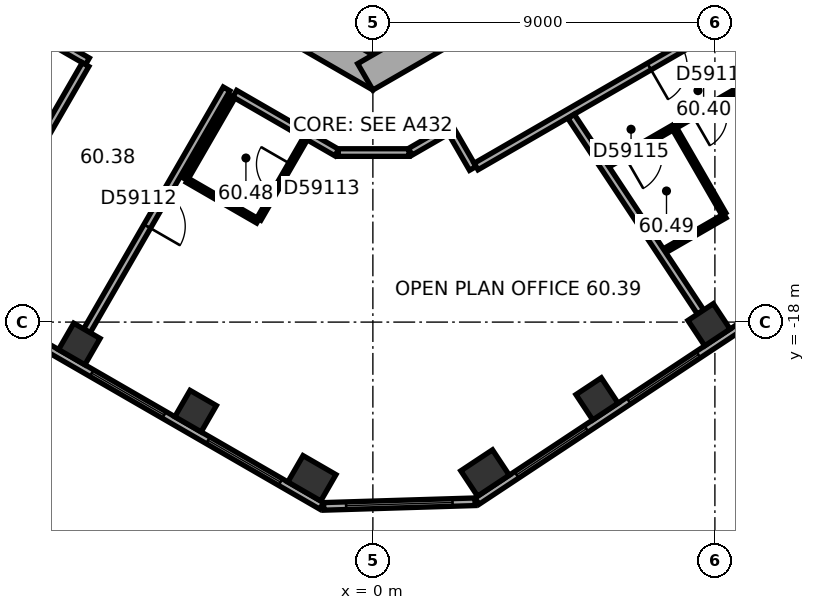
"""IFC4 building model, lengths in metres.
Left out: names, types, materials, properties, quantities, classifications, styles, units other than length and angle.
Written with IfcOpenShell. Run it as: python <this file> out.ifc"""

import sys

from ifc_helpers import new_model, si_unit, direction, frame, frame_2d, origin, origin_2d, place, context, subcontext, project, spatial, rectangle, extrude, element, fill, save


model = new_model("IFC4")
c1 = context("Model", 3, precision=1e-05, world=origin(), true_north=direction((0.0, 1.0)))
c2 = subcontext(c1, "Body", "Model", "MODEL_VIEW")
j1 = project(units=[si_unit("LENGTHUNIT", "METRE"), si_unit("PLANEANGLEUNIT", "RADIAN")], contexts=[c1])
p1 = place(None, origin())
s1 = spatial("IfcSite", under=j1, at=p1, CompositionType="ELEMENT")
p2 = place(p1, origin())
s2 = spatial("IfcBuilding", under=s1, at=p2, CompositionType="ELEMENT")
p3 = place(p2, frame((0.0, 0.0, 243.9)))
s3 = spatial("IfcBuildingStorey", under=s2, at=p3, CompositionType="ELEMENT", Elevation=243.9)
for number, where, z_axis, x_axis in (
    (1, (-7.725, -18.576, 0.0), (0.0, 0.0, 1.0), (0.866, -0.5, 0.0)),
    (2, (-4.665, -20.343, 0.0), (0.0, 0.0, 1.0), (0.866, -0.5, 0.0)),
):
    element("IfcColumn", number, at=place(p3, frame(where, z_axis=z_axis, x_axis=x_axis)), inside=s3, PredefinedType="COLUMN", context=c2, shape_type="SweptSolid", body=[
        extrude(rectangle(XDim=0.8, YDim=0.8, at=origin_2d()), origin(), (0.0, 0.0, 1.0), 3.7),
    ])
for number, where, z_axis, x_axis in (
    (3, (-1.604, -22.11, 0.0), (0.0, 0.0, 1.0), (0.866, -0.5, 0.0)),
    (4, (2.951, -21.971, 0.0), (0.0, 0.0, 1.0), (0.834, 0.552, 0.0)),
):
    element("IfcColumn", number, at=place(p3, frame(where, z_axis=z_axis, x_axis=x_axis)), inside=s3, PredefinedType="COLUMN", context=c2, shape_type="SweptSolid", body=[
        extrude(rectangle(XDim=1.0, YDim=0.8, at=origin_2d()), origin(), (0.0, 0.0, 1.0), 3.7),
    ])
for number, where, z_axis, x_axis in (
    (5, (5.898, -20.021, 0.0), (0.0, 0.0, 1.0), (0.834, 0.552, 0.0)),
    (6, (8.844, -18.07, 0.0), (0.0, 0.0, 1.0), (0.834, 0.552, 0.0)),
):
    element("IfcColumn", number, at=place(p3, frame(where, z_axis=z_axis, x_axis=x_axis)), inside=s3, PredefinedType="COLUMN", context=c2, shape_type="SweptSolid", body=[
        extrude(rectangle(XDim=0.8, YDim=0.8, at=origin_2d()), origin(), (0.0, 0.0, 1.0), 3.7),
    ])
p4 = place(p3, frame((-10.1, -5.6, 0.0), z_axis=(0.0, 0.0, 1.0), x_axis=(0.866023897231, -0.500002609418, 0.0)))
e7 = element("IfcWall", 7, at=p4, inside=s3, PredefinedType="SHEAR", context=c2, shape_type="SweptSolid", body=[
    extrude(rectangle(XDim=11.894, YDim=0.8, at=frame_2d((5.947, 0.0))), origin(), (0.0, 0.0, 1.0), 3.7),
])
p5 = place(p4, frame((6.147, 0.0, 0.0)))
e8 = element("IfcOpeningElement", 8, at=p5, cuts=e7, PredefinedType="OPENING", context=c2, shape_type="SweptSolid", body=[
    extrude(rectangle(XDim=1.5, YDim=2.1, at=frame_2d((0.75, 1.05))), frame((0.0, 0.41, 0.0), z_axis=(0.0, -1.0, 0.0), x_axis=(1.0, 0.0, 0.0)), (0.0, 0.0, 1.0), 0.82),
])
p6 = place(p4, frame((1.597, 0.0, 0.0)))
e9 = element("IfcOpeningElement", 9, at=p6, cuts=e7, PredefinedType="OPENING", context=c2, shape_type="SweptSolid", body=[
    extrude(rectangle(XDim=1.1, YDim=2.1, at=frame_2d((0.55, 1.05))), frame((0.0, 0.41, 0.0), z_axis=(0.0, -1.0, 0.0), x_axis=(1.0, 0.0, 0.0)), (0.0, 0.0, 1.0), 0.82),
])
p7 = place(p4, frame((4.197, 0.0, 0.0)))
e10 = element("IfcOpeningElement", 10, at=p7, cuts=e7, PredefinedType="OPENING", context=c2, shape_type="SweptSolid", body=[
    extrude(rectangle(XDim=1.1, YDim=2.1, at=frame_2d((0.55, 1.05))), frame((0.0, 0.41, 0.0), z_axis=(0.0, -1.0, 0.0), x_axis=(1.0, 0.0, 0.0)), (0.0, 0.0, 1.0), 0.82),
])
p8 = place(p3, frame((-0.2, -11.547, 0.0), z_axis=(0.0, 0.0, 1.0), x_axis=(0.866023897231, 0.500002609418, 0.0)))
e11 = element("IfcWall", 11, at=p8, inside=s3, PredefinedType="SHEAR", context=c2, shape_type="SweptSolid", body=[
    extrude(rectangle(XDim=11.894, YDim=0.8, at=frame_2d((5.947, 0.0))), origin(), (0.0, 0.0, 1.0), 3.7),
])
p9 = place(p8, frame((2.497, 0.0, 0.0)))
e12 = element("IfcOpeningElement", 12, at=p9, cuts=e11, PredefinedType="OPENING", context=c2, shape_type="SweptSolid", body=[
    extrude(rectangle(XDim=1.1, YDim=2.1, at=frame_2d((0.55, 1.05))), frame((0.0, 0.41, 0.0), z_axis=(0.0, -1.0, 0.0), x_axis=(1.0, 0.0, 0.0)), (0.0, 0.0, 1.0), 0.82),
])
p10 = place(p8, frame((5.097, 0.0, 0.0)))
e13 = element("IfcOpeningElement", 13, at=p10, cuts=e11, PredefinedType="OPENING", context=c2, shape_type="SweptSolid", body=[
    extrude(rectangle(XDim=1.1, YDim=2.1, at=frame_2d((0.55, 1.05))), frame((0.0, 0.41, 0.0), z_axis=(0.0, -1.0, 0.0), x_axis=(1.0, 0.0, 0.0)), (0.0, 0.0, 1.0), 0.82),
])
p11 = place(p8, frame((7.697, 0.0, 0.0)))
e14 = element("IfcOpeningElement", 14, at=p11, cuts=e11, PredefinedType="OPENING", context=c2, shape_type="SweptSolid", body=[
    extrude(rectangle(XDim=1.1, YDim=2.1, at=frame_2d((0.55, 1.05))), frame((0.0, 0.41, 0.0), z_axis=(0.0, -1.0, 0.0), x_axis=(1.0, 0.0, 0.0)), (0.0, 0.0, 1.0), 0.82),
])
p12 = place(p3, frame((-17.664, -13.415, 0.0), z_axis=(0.0, 0.0, 1.0), x_axis=(0.866026555358, -0.49999800541, 0.0)))
e15 = element("IfcWall", 15, at=p12, inside=s3, PredefinedType="STANDARD", context=c2, shape_type="SweptSolid", body=[
    extrude(rectangle(XDim=18.841, YDim=0.2, at=frame_2d((9.421, 0.0))), origin(), (0.0, 0.0, 1.0), 3.7),
])
p13 = place(p12, frame((1.254, 0.0, 0.9)))
e16 = element("IfcOpeningElement", 16, at=p13, cuts=e15, PredefinedType="OPENING", context=c2, shape_type="SweptSolid", body=[
    extrude(rectangle(XDim=2.2, YDim=2.0, at=frame_2d((1.1, 1.0))), frame((0.0, 0.11, 0.0), z_axis=(0.0, -1.0, 0.0), x_axis=(1.0, 0.0, 0.0)), (0.0, 0.0, 1.0), 0.22),
])
p14 = place(p12, frame((4.788, 0.0, 0.9)))
e17 = element("IfcOpeningElement", 17, at=p14, cuts=e15, PredefinedType="OPENING", context=c2, shape_type="SweptSolid", body=[
    extrude(rectangle(XDim=2.2, YDim=2.0, at=frame_2d((1.1, 1.0))), frame((0.0, 0.11, 0.0), z_axis=(0.0, -1.0, 0.0), x_axis=(1.0, 0.0, 0.0)), (0.0, 0.0, 1.0), 0.22),
])
p15 = place(p12, frame((8.322, 0.0, 0.9)))
e18 = element("IfcOpeningElement", 18, at=p15, cuts=e15, PredefinedType="OPENING", context=c2, shape_type="SweptSolid", body=[
    extrude(rectangle(XDim=2.2, YDim=2.0, at=frame_2d((1.1, 1.0))), frame((0.0, 0.11, 0.0), z_axis=(0.0, -1.0, 0.0), x_axis=(1.0, 0.0, 0.0)), (0.0, 0.0, 1.0), 0.22),
])
p16 = place(p12, frame((11.855, 0.0, 0.9)))
e19 = element("IfcOpeningElement", 19, at=p16, cuts=e15, PredefinedType="OPENING", context=c2, shape_type="SweptSolid", body=[
    extrude(rectangle(XDim=2.2, YDim=2.0, at=frame_2d((1.1, 1.0))), frame((0.0, 0.11, 0.0), z_axis=(0.0, -1.0, 0.0), x_axis=(1.0, 0.0, 0.0)), (0.0, 0.0, 1.0), 0.22),
])
p17 = place(p12, frame((15.389, 0.0, 0.9)))
e20 = element("IfcOpeningElement", 20, at=p17, cuts=e15, PredefinedType="OPENING", context=c2, shape_type="SweptSolid", body=[
    extrude(rectangle(XDim=2.2, YDim=2.0, at=frame_2d((1.1, 1.0))), frame((0.0, 0.11, 0.0), z_axis=(0.0, -1.0, 0.0), x_axis=(1.0, 0.0, 0.0)), (0.0, 0.0, 1.0), 0.22),
])
p18 = place(p3, frame((-1.294, -22.849, 0.0), z_axis=(0.0, 0.0, 1.0), x_axis=(0.999533952558, 0.030526671678, 0.0)))
e21 = element("IfcWall", 21, at=p18, inside=s3, PredefinedType="STANDARD", context=c2, shape_type="SweptSolid", body=[
    extrude(rectangle(XDim=3.983, YDim=0.2, at=frame_2d((1.991, 0.0))), origin(), (0.0, 0.0, 1.0), 3.7),
])
p19 = place(p18, frame((0.591, 0.0, 0.9)))
e22 = element("IfcOpeningElement", 22, at=p19, cuts=e21, PredefinedType="OPENING", context=c2, shape_type="SweptSolid", body=[
    extrude(rectangle(XDim=2.8, YDim=2.0, at=frame_2d((1.4, 1.0))), frame((0.0, 0.11, 0.0), z_axis=(0.0, -1.0, 0.0), x_axis=(1.0, 0.0, 0.0)), (0.0, 0.0, 1.0), 0.22),
])
p20 = place(p3, frame((2.739, -22.711, 0.0), z_axis=(0.0, 0.0, 1.0), x_axis=(0.833885723098, 0.551937134838, 0.0)))
e23 = element("IfcWall", 23, at=p20, inside=s3, PredefinedType="STANDARD", context=c2, shape_type="SweptSolid", body=[
    extrude(rectangle(XDim=18.841, YDim=0.2, at=frame_2d((9.421, 0.0))), origin(), (0.0, 0.0, 1.0), 3.7),
])
p21 = place(p20, frame((1.252, 0.0, 0.9)))
e24 = element("IfcOpeningElement", 24, at=p21, cuts=e23, PredefinedType="OPENING", context=c2, shape_type="SweptSolid", body=[
    extrude(rectangle(XDim=2.2, YDim=2.0, at=frame_2d((1.1, 1.0))), frame((0.0, 0.11, 0.0), z_axis=(0.0, -1.0, 0.0), x_axis=(1.0, 0.0, 0.0)), (0.0, 0.0, 1.0), 0.22),
])
p22 = place(p20, frame((4.786, 0.0, 0.9)))
e25 = element("IfcOpeningElement", 25, at=p22, cuts=e23, PredefinedType="OPENING", context=c2, shape_type="SweptSolid", body=[
    extrude(rectangle(XDim=2.2, YDim=2.0, at=frame_2d((1.1, 1.0))), frame((0.0, 0.11, 0.0), z_axis=(0.0, -1.0, 0.0), x_axis=(1.0, 0.0, 0.0)), (0.0, 0.0, 1.0), 0.22),
])
p23 = place(p20, frame((8.32, 0.0, 0.9)))
e26 = element("IfcOpeningElement", 26, at=p23, cuts=e23, PredefinedType="OPENING", context=c2, shape_type="SweptSolid", body=[
    extrude(rectangle(XDim=2.2, YDim=2.0, at=frame_2d((1.1, 1.0))), frame((0.0, 0.11, 0.0), z_axis=(0.0, -1.0, 0.0), x_axis=(1.0, 0.0, 0.0)), (0.0, 0.0, 1.0), 0.22),
])
p24 = place(p20, frame((11.854, 0.0, 0.9)))
e27 = element("IfcOpeningElement", 27, at=p24, cuts=e23, PredefinedType="OPENING", context=c2, shape_type="SweptSolid", body=[
    extrude(rectangle(XDim=2.2, YDim=2.0, at=frame_2d((1.1, 1.0))), frame((0.0, 0.11, 0.0), z_axis=(0.0, -1.0, 0.0), x_axis=(1.0, 0.0, 0.0)), (0.0, 0.0, 1.0), 0.22),
])
p25 = place(p20, frame((15.387, 0.0, 0.9)))
e28 = element("IfcOpeningElement", 28, at=p25, cuts=e23, PredefinedType="OPENING", context=c2, shape_type="SweptSolid", body=[
    extrude(rectangle(XDim=2.2, YDim=2.0, at=frame_2d((1.1, 1.0))), frame((0.0, 0.11, 0.0), z_axis=(0.0, -1.0, 0.0), x_axis=(1.0, 0.0, 0.0)), (0.0, 0.0, 1.0), 0.22),
])
p26 = place(p3, frame((-11.551, -8.805, 0.0), z_axis=(0.0, 0.0, 1.0), x_axis=(0.866038310922, -0.499977643516, 0.0)))
e29 = element("IfcWall", 29, at=p26, inside=s3, PredefinedType="PARTITIONING", context=c2, shape_type="SweptSolid", body=[
    extrude(rectangle(XDim=4.665, YDim=0.2, at=frame_2d((2.333, 0.0))), origin(), (0.0, 0.0, 1.0), 3.42),
])
p27 = place(p3, frame((-10.585, -16.463, 0.0), z_axis=(0.0, 0.0, 1.0), x_axis=(0.499993802756, 0.866028981735, 0.0)))
e30 = element("IfcWall", 30, at=p27, inside=s3, PredefinedType="PARTITIONING", context=c2, shape_type="SweptSolid", body=[
    extrude(rectangle(XDim=6.049, YDim=0.2, at=frame_2d((3.024, 0.0))), origin(), (0.0, 0.0, 1.0), 2.87),
])
p28 = place(p27, frame((2.524, 0.0, 0.0)))
e31 = element("IfcOpeningElement", 31, at=p28, cuts=e30, PredefinedType="OPENING", context=c2, shape_type="SweptSolid", body=[
    extrude(rectangle(XDim=1.0, YDim=2.1, at=frame_2d((0.5, 1.05))), frame((0.0, 0.11, 0.0), z_axis=(0.0, -1.0, 0.0), x_axis=(1.0, 0.0, 0.0)), (0.0, 0.0, 1.0), 0.22),
])
p29 = place(p3, frame((-7.525, -18.23, 0.0), z_axis=(0.0, 0.0, 1.0), x_axis=(0.499983153418, 0.866035129944, 0.0)))
e32 = element("IfcWall", 32, at=p29, inside=s3, PredefinedType="PARTITIONING", context=c2, shape_type="SweptSolid", body=[
    extrude(rectangle(XDim=7.35, YDim=0.2, at=frame_2d((3.675, 0.0))), origin(), (0.0, 0.0, 1.0), 3.42),
])
p30 = place(p29, frame((3.175, 0.0, 0.0)))
e33 = element("IfcOpeningElement", 33, at=p30, cuts=e32, PredefinedType="OPENING", context=c2, shape_type="SweptSolid", body=[
    extrude(rectangle(XDim=1.0, YDim=2.1, at=frame_2d((0.5, 1.05))), frame((0.0, 0.11, 0.0), z_axis=(0.0, -1.0, 0.0), x_axis=(1.0, 0.0, 0.0)), (0.0, 0.0, 1.0), 0.22),
])
p31 = place(p3, frame((-4.934, -14.241, 0.0), z_axis=(0.0, 0.0, 1.0), x_axis=(0.500004234368, 0.866022959057, 0.0)))
e34 = element("IfcWall", 34, at=p31, inside=s3, PredefinedType="PARTITIONING", context=c2, shape_type="SweptSolid", body=[
    extrude(rectangle(XDim=2.5, YDim=0.12, at=frame_2d((1.25, 0.0))), origin(), (0.0, 0.0, 1.0), 3.42),
])
p32 = place(p3, frame((-3.634, -11.99, 0.0), z_axis=(0.0, 0.0, 1.0), x_axis=(0.866033392248, -0.499986163319, 0.0)))
e35 = element("IfcWall", 35, at=p32, inside=s3, PredefinedType="PARTITIONING", context=c2, shape_type="SweptSolid", body=[
    extrude(rectangle(XDim=3.099, YDim=0.2, at=frame_2d((1.549, 0.0))), origin(), (0.0, 0.0, 1.0), 3.42),
])
p33 = place(p3, frame((-3.028, -15.341, 0.0), z_axis=(0.0, 0.0, 1.0), x_axis=(-0.86600889856, 0.500028586798, 0.0)))
e36 = element("IfcWall", 36, at=p33, inside=s3, PredefinedType="PARTITIONING", context=c2, shape_type="SweptSolid", body=[
    extrude(rectangle(XDim=2.14, YDim=0.12, at=frame_2d((1.07, 0.0))), origin(), (0.0, 0.0, 1.0), 3.42),
])
p34 = place(p3, frame((-1.778, -13.176, 0.0), z_axis=(0.0, 0.0, 1.0), x_axis=(-0.500002508028, -0.866023955769, 0.0)))
e37 = element("IfcWall", 37, at=p34, inside=s3, PredefinedType="PARTITIONING", context=c2, shape_type="SweptSolid", body=[
    extrude(rectangle(XDim=2.44, YDim=0.12, at=frame_2d((1.22, 0.0))), origin(), (0.0, 0.0, 1.0), 3.42),
])
p35 = place(p34, frame((0.77, 0.0, 0.0)))
e38 = element("IfcOpeningElement", 38, at=p35, cuts=e37, PredefinedType="OPENING", context=c2, shape_type="SweptSolid", body=[
    extrude(rectangle(XDim=0.9, YDim=2.1, at=frame_2d((0.45, 1.05))), frame((0.0, 0.07, 0.0), z_axis=(0.0, -1.0, 0.0), x_axis=(1.0, 0.0, 0.0)), (0.0, 0.0, 1.0), 0.14),
])
p36 = place(p3, frame((-0.91, -13.539, 0.0), z_axis=(0.0, 0.0, 1.0), x_axis=(1.0, 0.0, 0.0)))
e39 = element("IfcWall", 39, at=p36, inside=s3, PredefinedType="PARTITIONING", context=c2, shape_type="SweptSolid", body=[
    extrude(rectangle(XDim=1.86, YDim=0.2, at=frame_2d((0.93, 0.0))), origin(), (0.0, 0.0, 1.0), 3.42),
])
p37 = place(p3, frame((0.985, -13.519, 0.0), z_axis=(0.0, 0.0, 1.0), x_axis=(0.866054082991, 0.499950322867, 0.0)))
e40 = element("IfcWall", 40, at=p37, inside=s3, PredefinedType="PARTITIONING", context=c2, shape_type="SweptSolid", body=[
    extrude(rectangle(XDim=1.206, YDim=0.2, at=frame_2d((0.603, 0.0))), origin(), (0.0, 0.0, 1.0), 3.42),
])
p38 = place(p3, frame((2.079, -13.003, 0.0), z_axis=(0.0, 0.0, 1.0), x_axis=(0.500074377092, -0.865982457891, 0.0)))
e41 = element("IfcWall", 41, at=p38, inside=s3, PredefinedType="PARTITIONING", context=c2, shape_type="SweptSolid", body=[
    extrude(rectangle(XDim=1.101, YDim=0.2, at=frame_2d((0.55, 0.0))), origin(), (0.0, 0.0, 1.0), 3.42),
])
p39 = place(p3, frame((2.716, -13.906, 0.0), z_axis=(0.0, 0.0, 1.0), x_axis=(0.866040290674, 0.499974214264, 0.0)))
e42 = element("IfcWall", 42, at=p39, inside=s3, PredefinedType="PARTITIONING", context=c2, shape_type="SweptSolid", body=[
    extrude(rectangle(XDim=8.702, YDim=0.2, at=frame_2d((4.351, 0.0))), origin(), (0.0, 0.0, 1.0), 3.42),
])
p40 = place(p39, frame((5.26, 0.0, 0.0)))
e43 = element("IfcOpeningElement", 43, at=p40, cuts=e42, PredefinedType="OPENING", context=c2, shape_type="SweptSolid", body=[
    extrude(rectangle(XDim=1.0, YDim=2.1, at=frame_2d((0.5, 1.05))), frame((0.0, 0.11, 0.0), z_axis=(0.0, -1.0, 0.0), x_axis=(1.0, 0.0, 0.0)), (0.0, 0.0, 1.0), 0.22),
])
p41 = place(p3, frame((6.183, -13.867, 0.0), z_axis=(0.0, 0.0, 1.0), x_axis=(0.866031365477, 0.499989673903, 0.0)))
e44 = element("IfcWall", 44, at=p41, inside=s3, PredefinedType="PARTITIONING", context=c2, shape_type="SweptSolid", body=[
    extrude(rectangle(XDim=6.881, YDim=0.12, at=frame_2d((3.44, 0.0))), origin(), (0.0, 0.0, 1.0), 3.42),
])
p42 = place(p41, frame((0.5, 0.0, 0.0)))
e45 = element("IfcOpeningElement", 45, at=p42, cuts=e44, PredefinedType="OPENING", context=c2, shape_type="SweptSolid", body=[
    extrude(rectangle(XDim=1.0, YDim=2.1, at=frame_2d((0.5, 1.05))), frame((0.0, 0.07, 0.0), z_axis=(0.0, -1.0, 0.0), x_axis=(1.0, 0.0, 0.0)), (0.0, 0.0, 1.0), 0.14),
])
p43 = place(p41, frame((2.583, 0.0, 0.0)))
e46 = element("IfcOpeningElement", 46, at=p43, cuts=e44, PredefinedType="OPENING", context=c2, shape_type="SweptSolid", body=[
    extrude(rectangle(XDim=0.9, YDim=2.1, at=frame_2d((0.45, 1.05))), frame((0.0, 0.07, 0.0), z_axis=(0.0, -1.0, 0.0), x_axis=(1.0, 0.0, 0.0)), (0.0, 0.0, 1.0), 0.14),
])
p44 = place(p41, frame((5.023, 0.0, 0.0)))
e47 = element("IfcOpeningElement", 47, at=p44, cuts=e44, PredefinedType="OPENING", context=c2, shape_type="SweptSolid", body=[
    extrude(rectangle(XDim=0.9, YDim=2.1, at=frame_2d((0.45, 1.05))), frame((0.0, 0.07, 0.0), z_axis=(0.0, -1.0, 0.0), x_axis=(1.0, 0.0, 0.0)), (0.0, 0.0, 1.0), 0.14),
])
p45 = place(p3, frame((7.676, -16.123, 0.0), z_axis=(0.0, 0.0, 1.0), x_axis=(0.866023842607, 0.500002704028, 0.0)))
e48 = element("IfcWall", 48, at=p45, inside=s3, PredefinedType="PARTITIONING", context=c2, shape_type="SweptSolid", body=[
    extrude(rectangle(XDim=1.835, YDim=0.12, at=frame_2d((0.917, 0.0))), origin(), (0.0, 0.0, 1.0), 3.42),
])
p46 = place(p3, frame((8.624, -17.737, 0.0), z_axis=(0.0, 0.0, 1.0), x_axis=(-0.55193161762, 0.83388937484, 0.0)))
e49 = element("IfcWall", 49, at=p46, inside=s3, PredefinedType="PARTITIONING", context=c2, shape_type="SweptSolid", body=[
    extrude(rectangle(XDim=6.173, YDim=0.2, at=frame_2d((3.086, 0.0))), origin(), (0.0, 0.0, 1.0), 2.87),
])
p47 = place(p3, frame((9.235, -15.154, 0.0), z_axis=(0.0, 0.0, 1.0), x_axis=(-0.500006411147, 0.866021702275, 0.0)))
e50 = element("IfcWall", 50, at=p47, inside=s3, PredefinedType="PARTITIONING", context=c2, shape_type="SweptSolid", body=[
    extrude(rectangle(XDim=2.58, YDim=0.12, at=frame_2d((1.29, 0.0))), origin(), (0.0, 0.0, 1.0), 3.42),
])
p48 = place(p16, origin())
e51 = element("IfcWindow", 51, at=p48, inside=s3, PartitioningType="SINGLE_PANEL", PredefinedType="WINDOW", context=c2, shape_type="SweptSolid", body=[
    extrude(rectangle(XDim=2.2, YDim=2.0, at=frame_2d((1.1, 1.0))), frame((0.0, 0.03, 0.0), z_axis=(0.0, -1.0, 0.0), x_axis=(1.0, 0.0, 0.0)), (0.0, 0.0, 1.0), 0.06),
])
fill(e19, e51)
p49 = place(p17, origin())
e52 = element("IfcWindow", 52, at=p49, inside=s3, PartitioningType="SINGLE_PANEL", PredefinedType="WINDOW", context=c2, shape_type="SweptSolid", body=[
    extrude(rectangle(XDim=2.2, YDim=2.0, at=frame_2d((1.1, 1.0))), frame((0.0, 0.03, 0.0), z_axis=(0.0, -1.0, 0.0), x_axis=(1.0, 0.0, 0.0)), (0.0, 0.0, 1.0), 0.06),
])
fill(e20, e52)
p50 = place(p19, origin())
e53 = element("IfcWindow", 53, at=p50, inside=s3, PartitioningType="SINGLE_PANEL", PredefinedType="WINDOW", context=c2, shape_type="SweptSolid", body=[
    extrude(rectangle(XDim=2.8, YDim=2.0, at=frame_2d((1.4, 1.0))), frame((0.0, 0.03, 0.0), z_axis=(0.0, -1.0, 0.0), x_axis=(1.0, 0.0, 0.0)), (0.0, 0.0, 1.0), 0.06),
])
fill(e22, e53)
p51 = place(p21, origin())
e54 = element("IfcWindow", 54, at=p51, inside=s3, PartitioningType="SINGLE_PANEL", PredefinedType="WINDOW", context=c2, shape_type="SweptSolid", body=[
    extrude(rectangle(XDim=2.2, YDim=2.0, at=frame_2d((1.1, 1.0))), frame((0.0, 0.03, 0.0), z_axis=(0.0, -1.0, 0.0), x_axis=(1.0, 0.0, 0.0)), (0.0, 0.0, 1.0), 0.06),
])
fill(e24, e54)
p52 = place(p22, origin())
e55 = element("IfcWindow", 55, at=p52, inside=s3, PartitioningType="SINGLE_PANEL", PredefinedType="WINDOW", context=c2, shape_type="SweptSolid", body=[
    extrude(rectangle(XDim=2.2, YDim=2.0, at=frame_2d((1.1, 1.0))), frame((0.0, 0.03, 0.0), z_axis=(0.0, -1.0, 0.0), x_axis=(1.0, 0.0, 0.0)), (0.0, 0.0, 1.0), 0.06),
])
fill(e25, e55)
p53 = place(p30, origin())
e56 = element("IfcDoor", 56, at=p53, inside=s3, OperationType="SINGLE_SWING_LEFT", PredefinedType="DOOR", context=c2, shape_type="SweptSolid", body=[
    extrude(rectangle(XDim=1.0, YDim=2.1, at=frame_2d((0.5, 1.05))), frame((0.0, 0.025, 0.0), z_axis=(0.0, -1.0, 0.0), x_axis=(1.0, 0.0, 0.0)), (0.0, 0.0, 1.0), 0.05),
])
fill(e33, e56)
p54 = place(p35, origin())
e57 = element("IfcDoor", 57, at=p54, inside=s3, OperationType="SINGLE_SWING_LEFT", PredefinedType="DOOR", context=c2, shape_type="SweptSolid", body=[
    extrude(rectangle(XDim=0.9, YDim=2.1, at=frame_2d((0.45, 1.05))), frame((0.0, 0.025, 0.0), z_axis=(0.0, -1.0, 0.0), x_axis=(1.0, 0.0, 0.0)), (0.0, 0.0, 1.0), 0.05),
])
fill(e38, e57)
p55 = place(p40, origin())
e58 = element("IfcDoor", 58, at=p55, inside=s3, OperationType="SINGLE_SWING_LEFT", PredefinedType="DOOR", context=c2, shape_type="SweptSolid", body=[
    extrude(rectangle(XDim=1.0, YDim=2.1, at=frame_2d((0.5, 1.05))), frame((0.0, 0.025, 0.0), z_axis=(0.0, -1.0, 0.0), x_axis=(1.0, 0.0, 0.0)), (0.0, 0.0, 1.0), 0.05),
])
fill(e43, e58)
p56 = place(p42, origin())
e59 = element("IfcDoor", 59, at=p56, inside=s3, OperationType="SINGLE_SWING_LEFT", PredefinedType="DOOR", context=c2, shape_type="SweptSolid", body=[
    extrude(rectangle(XDim=1.0, YDim=2.1, at=frame_2d((0.5, 1.05))), frame((0.0, 0.025, 0.0), z_axis=(0.0, -1.0, 0.0), x_axis=(1.0, 0.0, 0.0)), (0.0, 0.0, 1.0), 0.05),
])
fill(e45, e59)
p57 = place(p43, origin())
e60 = element("IfcDoor", 60, at=p57, inside=s3, OperationType="SINGLE_SWING_LEFT", PredefinedType="DOOR", context=c2, shape_type="SweptSolid", body=[
    extrude(rectangle(XDim=0.9, YDim=2.1, at=frame_2d((0.45, 1.05))), frame((0.0, 0.025, 0.0), z_axis=(0.0, -1.0, 0.0), x_axis=(1.0, 0.0, 0.0)), (0.0, 0.0, 1.0), 0.05),
])
fill(e46, e60)
save(model, sys.argv[1])
